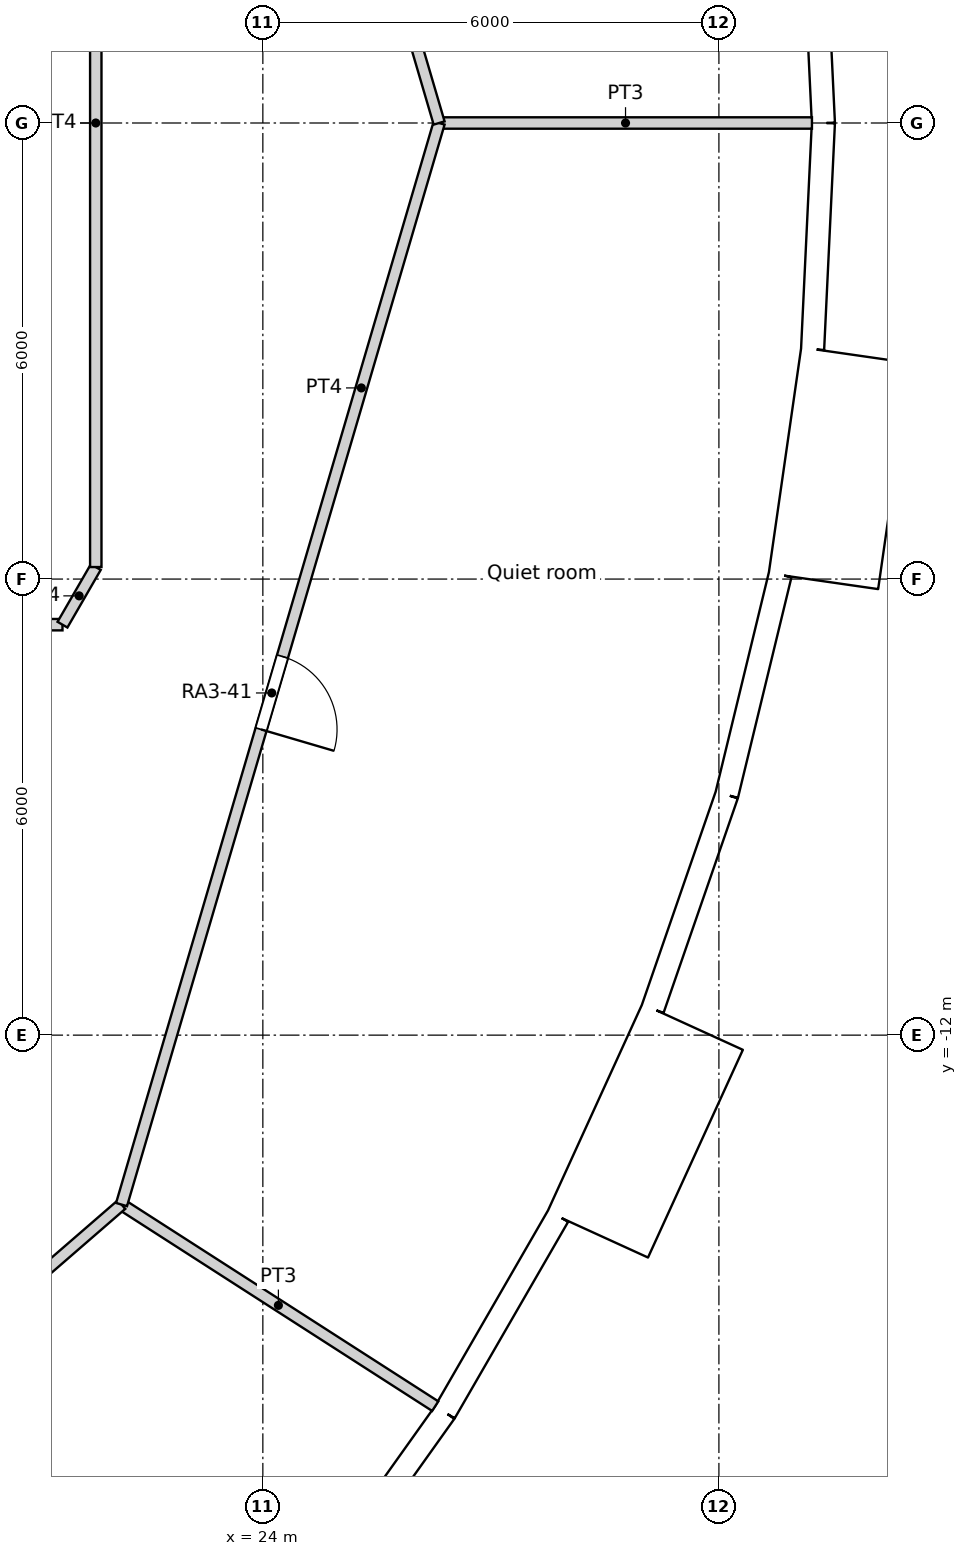
"""IFC4 building model, lengths in metres.
Left out: names, types, materials, properties, quantities, classifications, styles, units other than length and angle.
Written with IfcOpenShell. Run it as: python <this file> out.ifc"""

import sys

from ifc_helpers import new_model, si_unit, direction, frame, frame_2d, origin, origin_2d, place, context, subcontext, project, spatial, rectangle, circle, extrude, element, fill, save


model = new_model("IFC4")
c1 = context("Model", 3, precision=1e-05, world=origin(), true_north=direction((0.0, 1.0)))
c2 = subcontext(c1, "Body", "Model", "MODEL_VIEW")
j1 = project(units=[si_unit("LENGTHUNIT", "METRE"), si_unit("PLANEANGLEUNIT", "RADIAN")], contexts=[c1])
p1 = place(None, origin())
s1 = spatial("IfcSite", under=j1, at=p1, CompositionType="ELEMENT")
p2 = place(p1, origin())
s2 = spatial("IfcBuilding", under=s1, at=p2, CompositionType="ELEMENT")
p3 = place(p2, frame((0.0, 0.0, 49.8)))
s3 = spatial("IfcBuildingStorey", under=s2, at=p3, CompositionType="ELEMENT", Elevation=49.8)
for number, where, z_axis, x_axis in (
    (1, (30.275, 0.0, 0.0), (0.0, 0.0, 1.0), (1.0, 0.0, 0.0)),
    (2, (25.469, -16.368, 0.0), (0.0, 0.0, 1.0), (1.0, 0.0, 0.0)),
    (3, (28.106, -11.252, 0.0), (0.0, 0.0, 1.0), (1.0, 0.0, 0.0)),
    (4, (29.728, -5.729, 0.0), (0.0, 0.0, 1.0), (1.0, 0.0, 0.0)),
):
    element("IfcColumn", number, at=place(p3, frame(where, z_axis=z_axis, x_axis=x_axis)), inside=s3, PredefinedType="COLUMN", context=c2, shape_type="SweptSolid", body=[
        extrude(circle(Radius=0.7, at=origin_2d()), origin(), (0.0, 0.0, 1.0), 3.6),
    ])
for number, where, z_axis, x_axis in (
    (5, (24.548, 0.0, 0.0), (0.0, 0.0, 1.0), (1.0, 0.0, 0.0)),
    (6, (21.937, -11.017, 0.0), (0.0, 0.0, 1.0), (1.0, 0.0, 0.0)),
    (7, (23.886, -5.661, 0.0), (0.0, 0.0, 1.0), (1.0, 0.0, 0.0)),
):
    element("IfcColumn", number, at=place(p3, frame(where, z_axis=z_axis, x_axis=x_axis)), inside=s3, PredefinedType="COLUMN", context=c2, shape_type="SweptSolid", body=[
        extrude(circle(Radius=0.75, at=origin_2d()), origin(), (0.0, 0.0, 1.0), 3.6),
    ])
p4 = place(p3, frame((31.375, 0.0, 0.0), z_axis=(0.0, 0.0, 1.0), x_axis=(-0.047604077644, 0.998866283239, 0.0)))
e8 = element("IfcWall", 8, at=p4, inside=s3, PredefinedType="SOLIDWALL", context=c2, shape_type="SweptSolid", body=[
    extrude(rectangle(XDim=2.98, YDim=0.3, at=frame_2d((1.49, 0.0))), origin(), (0.0, 0.0, 1.0), 3.15),
])
p5 = place(p4, frame((1.49, 0.0, 1.55)))
e9 = element("IfcOpeningElement", 9, at=p5, cuts=e8, PredefinedType="OPENING", context=c2, shape_type="SweptSolid", body=[
    extrude(circle(Radius=0.9, at=origin_2d()), frame((0.0, 0.16, 0.0), z_axis=(0.0, -1.0, 0.0), x_axis=(1.0, 0.0, 0.0)), (0.0, 0.0, 1.0), 0.32),
])
p6 = place(p3, frame((24.666, -19.389, 0.0), z_axis=(0.0, 0.0, 1.0), x_axis=(0.580059407678, 0.81457417315, 0.0)))
e10 = element("IfcWall", 10, at=p6, inside=s3, PredefinedType="SOLIDWALL", context=c2, shape_type="SweptSolid", body=[
    extrude(rectangle(XDim=2.979, YDim=0.3, at=frame_2d((1.49, 0.0))), origin(), (0.0, 0.0, 1.0), 3.15),
])
p7 = place(p6, frame((1.49, 0.0, 1.55)))
e11 = element("IfcOpeningElement", 11, at=p7, cuts=e10, PredefinedType="OPENING", context=c2, shape_type="SweptSolid", body=[
    extrude(circle(Radius=0.9, at=origin_2d()), frame((0.0, 0.16, 0.0), z_axis=(0.0, -1.0, 0.0), x_axis=(1.0, 0.0, 0.0)), (0.0, 0.0, 1.0), 0.32),
])
p8 = place(p3, frame((26.394, -16.962, 0.0), z_axis=(0.0, 0.0, 1.0), x_axis=(0.500025049464, 0.866010940986, 0.0)))
e12 = element("IfcWall", 12, at=p8, inside=s3, PredefinedType="SOLIDWALL", context=c2, shape_type="SweptSolid", body=[
    extrude(rectangle(XDim=2.98, YDim=0.3, at=frame_2d((1.49, 0.0))), origin(), (0.0, 0.0, 1.0), 3.15),
])
p9 = place(p8, frame((1.49, 0.0, 1.55)))
e13 = element("IfcOpeningElement", 13, at=p9, cuts=e12, PredefinedType="OPENING", context=c2, shape_type="SweptSolid", body=[
    extrude(circle(Radius=0.9, at=origin_2d()), frame((0.0, 0.16, 0.0), z_axis=(0.0, -1.0, 0.0), x_axis=(1.0, 0.0, 0.0)), (0.0, 0.0, 1.0), 0.32),
])
p10 = place(p3, frame((28.407, -14.622, -0.45), z_axis=(0.0, 0.0, 1.0), x_axis=(0.415427028395, 0.909626508012, 0.0)))
e14 = element("IfcWall", 14, at=p10, inside=s3, PredefinedType="ELEMENTEDWALL", context=c2, shape_type="SweptSolid", body=[
    extrude(rectangle(XDim=3.0, YDim=1.45, at=frame_2d((1.5, 0.0))), origin(), (0.0, 0.0, 1.0), 3.6),
])
p11 = place(p10, frame((1.5, 0.0, 2.0)))
e15 = element("IfcOpeningElement", 15, at=p11, cuts=e14, PredefinedType="OPENING", context=c2, shape_type="SweptSolid", body=[
    extrude(circle(Radius=0.9, at=origin_2d()), frame((0.0, 0.735, 0.0), z_axis=(0.0, -1.0, 0.0), x_axis=(1.0, 0.0, 0.0)), (0.0, 0.0, 1.0), 1.47),
])
p12 = place(p3, frame((29.129, -11.655, 0.0), z_axis=(0.0, 0.0, 1.0), x_axis=(0.327071167136, 0.944999709856, 0.0)))
e16 = element("IfcWall", 16, at=p12, inside=s3, PredefinedType="SOLIDWALL", context=c2, shape_type="SweptSolid", body=[
    extrude(rectangle(XDim=2.98, YDim=0.3, at=frame_2d((1.49, 0.0))), origin(), (0.0, 0.0, 1.0), 3.15),
])
p13 = place(p12, frame((1.49, 0.0, 1.55)))
e17 = element("IfcOpeningElement", 17, at=p13, cuts=e16, PredefinedType="OPENING", context=c2, shape_type="SweptSolid", body=[
    extrude(circle(Radius=0.9, at=origin_2d()), frame((0.0, 0.16, 0.0), z_axis=(0.0, -1.0, 0.0), x_axis=(1.0, 0.0, 0.0)), (0.0, 0.0, 1.0), 0.32),
])
p14 = place(p3, frame((30.104, -8.839, 0.0), z_axis=(0.0, 0.0, 1.0), x_axis=(0.235743081534, 0.971815414319, 0.0)))
e18 = element("IfcWall", 18, at=p14, inside=s3, PredefinedType="SOLIDWALL", context=c2, shape_type="SweptSolid", body=[
    extrude(rectangle(XDim=2.979, YDim=0.3, at=frame_2d((1.49, 0.0))), origin(), (0.0, 0.0, 1.0), 3.15),
])
p15 = place(p14, frame((1.49, 0.0, 1.55)))
e19 = element("IfcOpeningElement", 19, at=p15, cuts=e18, PredefinedType="OPENING", context=c2, shape_type="SweptSolid", body=[
    extrude(circle(Radius=0.9, at=origin_2d()), frame((0.0, 0.16, 0.0), z_axis=(0.0, -1.0, 0.0), x_axis=(1.0, 0.0, 0.0)), (0.0, 0.0, 1.0), 0.32),
])
p16 = place(p3, frame((31.375, -6.027, -0.45), z_axis=(0.0, 0.0, 1.0), x_axis=(0.142332746704, 0.989818866872, 0.0)))
e20 = element("IfcWall", 20, at=p16, inside=s3, PredefinedType="ELEMENTEDWALL", context=c2, shape_type="SweptSolid", body=[
    extrude(rectangle(XDim=3.0, YDim=1.45, at=frame_2d((1.5, 0.0))), origin(), (0.0, 0.0, 1.0), 3.6),
])
p17 = place(p16, frame((1.5, 0.0, 2.0)))
e21 = element("IfcOpeningElement", 21, at=p17, cuts=e20, PredefinedType="OPENING", context=c2, shape_type="SweptSolid", body=[
    extrude(circle(Radius=0.9, at=origin_2d()), frame((0.0, 0.735, 0.0), z_axis=(0.0, -1.0, 0.0), x_axis=(1.0, 0.0, 0.0)), (0.0, 0.0, 1.0), 1.47),
])
p18 = place(p3, frame((31.233, -2.976, 0.0), z_axis=(0.0, 0.0, 1.0), x_axis=(0.047604077644, 0.998866283239, 0.0)))
e22 = element("IfcWall", 22, at=p18, inside=s3, PredefinedType="SOLIDWALL", context=c2, shape_type="SweptSolid", body=[
    extrude(rectangle(XDim=2.98, YDim=0.3, at=frame_2d((1.49, 0.0))), origin(), (0.0, 0.0, 1.0), 3.15),
])
p19 = place(p18, frame((1.49, 0.0, 1.55)))
e23 = element("IfcOpeningElement", 23, at=p19, cuts=e22, PredefinedType="OPENING", context=c2, shape_type="SweptSolid", body=[
    extrude(circle(Radius=0.9, at=origin_2d()), frame((0.0, 0.16, 0.0), z_axis=(0.0, -1.0, 0.0), x_axis=(1.0, 0.0, 0.0)), (0.0, 0.0, 1.0), 0.32),
])
p20 = place(p3, frame((15.8, -6.6, 0.0), z_axis=(0.0, 0.0, 1.0), x_axis=(1.0, 0.0, 0.0)))
e24 = element("IfcWall", 24, at=p20, inside=s3, PredefinedType="PARTITIONING", context=c2, shape_type="SweptSolid", body=[
    extrude(rectangle(XDim=5.564, YDim=0.15, at=frame_2d((2.782, 0.0))), origin(), (0.0, 0.0, 1.0), 3.15),
])
p21 = place(p3, frame((21.364, -6.6, 0.0), z_axis=(0.0, 0.0, 1.0), x_axis=(0.500277597875, 0.865865073245, 0.0)))
e25 = element("IfcWall", 25, at=p21, inside=s3, PredefinedType="PARTITIONING", context=c2, shape_type="SweptSolid", body=[
    extrude(rectangle(XDim=0.875, YDim=0.15, at=frame_2d((0.438, 0.0))), origin(), (0.0, 0.0, 1.0), 3.15),
])
p22 = place(p3, frame((21.802, -5.842, 0.0), z_axis=(0.0, 0.0, 1.0), x_axis=(0.0, 1.0, 0.0)))
e26 = element("IfcWall", 26, at=p22, inside=s3, PredefinedType="PARTITIONING", context=c2, shape_type="SweptSolid", body=[
    extrude(rectangle(XDim=11.684, YDim=0.15, at=frame_2d((5.842, 0.0))), origin(), (0.0, 0.0, 1.0), 3.15),
])
p23 = place(p3, frame((22.141, 14.229, 0.0), z_axis=(0.0, 0.0, 1.0), x_axis=(0.281730446162, -0.959493593363, 0.0)))
e27 = element("IfcWall", 27, at=p23, inside=s3, PredefinedType="PARTITIONING", context=c2, shape_type="SweptSolid", body=[
    extrude(rectangle(XDim=14.83, YDim=0.15, at=frame_2d((7.415, 0.0))), origin(), (0.0, 0.0, 1.0), 3.15),
])
p24 = place(p23, frame((5.715, 0.0, 0.0)))
e28 = element("IfcOpeningElement", 28, at=p24, cuts=e27, PredefinedType="OPENING", context=c2, shape_type="SweptSolid", body=[
    extrude(rectangle(XDim=1.8, YDim=2.1, at=frame_2d((0.9, 1.05))), frame((0.0, 0.075, 0.0), z_axis=(0.0, -1.0, 0.0), x_axis=(1.0, 0.0, 0.0)), (0.0, 0.0, 1.0), 0.15),
])
p25 = place(p3, frame((10.933, -23.94, 0.0), z_axis=(0.0, 0.0, 1.0), x_axis=(0.755770011705, 0.654837147242, 0.0)))
e29 = element("IfcWall", 29, at=p25, inside=s3, PredefinedType="PARTITIONING", context=c2, shape_type="SweptSolid", body=[
    extrude(rectangle(XDim=14.83, YDim=0.15, at=frame_2d((7.415, 0.0))), origin(), (0.0, 0.0, 1.0), 3.15),
])
p26 = place(p25, frame((2.611, 0.0, 0.0)))
e30 = element("IfcOpeningElement", 30, at=p26, cuts=e29, PredefinedType="OPENING", context=c2, shape_type="SweptSolid", body=[
    extrude(rectangle(XDim=1.8, YDim=2.1, at=frame_2d((0.9, 1.05))), frame((0.0, 0.075, 0.0), z_axis=(0.0, -1.0, 0.0), x_axis=(1.0, 0.0, 0.0)), (0.0, 0.0, 1.0), 0.15),
])
p27 = place(p3, frame((22.141, -14.229, 0.0), z_axis=(0.0, 0.0, 1.0), x_axis=(0.281730446162, 0.959493593363, 0.0)))
e31 = element("IfcWall", 31, at=p27, inside=s3, PredefinedType="PARTITIONING", context=c2, shape_type="SweptSolid", body=[
    extrude(rectangle(XDim=14.83, YDim=0.15, at=frame_2d((7.415, 0.0))), origin(), (0.0, 0.0, 1.0), 3.15),
])
p28 = place(p27, frame((6.515, 0.0, 0.0)))
e32 = element("IfcOpeningElement", 32, at=p28, cuts=e31, PredefinedType="OPENING", context=c2, shape_type="SweptSolid", body=[
    extrude(rectangle(XDim=1.0, YDim=2.04, at=frame_2d((0.5, 1.02))), frame((0.0, 0.075, 0.0), z_axis=(0.0, -1.0, 0.0), x_axis=(1.0, 0.0, 0.0)), (0.0, 0.0, 1.0), 0.15),
])
p29 = place(p3, frame((26.319, 0.0, 0.0), z_axis=(0.0, 0.0, 1.0), x_axis=(1.0, 0.0, 0.0)))
e33 = element("IfcWall", 33, at=p29, inside=s3, PredefinedType="PARTITIONING", context=c2, shape_type="SweptSolid", body=[
    extrude(rectangle(XDim=4.905, YDim=0.15, at=frame_2d((2.453, 0.0))), origin(), (0.0, 0.0, 1.0), 3.15),
])
p30 = place(p3, frame((22.141, -14.229, 0.0), z_axis=(0.0, 0.0, 1.0), x_axis=(0.841265781699, -0.540621757371, 0.0)))
e34 = element("IfcWall", 34, at=p30, inside=s3, PredefinedType="PARTITIONING", context=c2, shape_type="SweptSolid", body=[
    extrude(rectangle(XDim=4.906, YDim=0.15, at=frame_2d((2.453, 0.0))), origin(), (0.0, 0.0, 1.0), 3.15),
])
p31 = place(p5, origin())
e35 = element("IfcWindow", 35, at=p31, inside=s3, PartitioningType="SINGLE_PANEL", PredefinedType="WINDOW", context=c2, shape_type="SweptSolid", body=[
    extrude(circle(Radius=0.9, at=origin_2d()), frame((0.0, 0.12, 0.0), z_axis=(0.0, -1.0, 0.0), x_axis=(1.0, 0.0, 0.0)), (0.0, 0.0, 1.0), 0.1),
])
fill(e9, e35)
p32 = place(p7, origin())
e36 = element("IfcWindow", 36, at=p32, inside=s3, PartitioningType="SINGLE_PANEL", PredefinedType="WINDOW", context=c2, shape_type="SweptSolid", body=[
    extrude(circle(Radius=0.9, at=origin_2d()), frame((0.0, 0.12, 0.0), z_axis=(0.0, -1.0, 0.0), x_axis=(1.0, 0.0, 0.0)), (0.0, 0.0, 1.0), 0.1),
])
fill(e11, e36)
p33 = place(p9, origin())
e37 = element("IfcWindow", 37, at=p33, inside=s3, PartitioningType="SINGLE_PANEL", PredefinedType="WINDOW", context=c2, shape_type="SweptSolid", body=[
    extrude(circle(Radius=0.9, at=origin_2d()), frame((0.0, 0.12, 0.0), z_axis=(0.0, -1.0, 0.0), x_axis=(1.0, 0.0, 0.0)), (0.0, 0.0, 1.0), 0.1),
])
fill(e13, e37)
p34 = place(p11, origin())
e38 = element("IfcWindow", 38, at=p34, inside=s3, PartitioningType="SINGLE_PANEL", PredefinedType="WINDOW", context=c2, shape_type="SweptSolid", body=[
    extrude(circle(Radius=0.9, at=origin_2d()), frame((0.0, 0.695, 0.0), z_axis=(0.0, -1.0, 0.0), x_axis=(1.0, 0.0, 0.0)), (0.0, 0.0, 1.0), 0.1),
])
fill(e15, e38)
p35 = place(p13, origin())
e39 = element("IfcWindow", 39, at=p35, inside=s3, PartitioningType="SINGLE_PANEL", PredefinedType="WINDOW", context=c2, shape_type="SweptSolid", body=[
    extrude(circle(Radius=0.9, at=origin_2d()), frame((0.0, 0.12, 0.0), z_axis=(0.0, -1.0, 0.0), x_axis=(1.0, 0.0, 0.0)), (0.0, 0.0, 1.0), 0.1),
])
fill(e17, e39)
p36 = place(p15, origin())
e40 = element("IfcWindow", 40, at=p36, inside=s3, PartitioningType="SINGLE_PANEL", PredefinedType="WINDOW", context=c2, shape_type="SweptSolid", body=[
    extrude(circle(Radius=0.9, at=origin_2d()), frame((0.0, 0.12, 0.0), z_axis=(0.0, -1.0, 0.0), x_axis=(1.0, 0.0, 0.0)), (0.0, 0.0, 1.0), 0.1),
])
fill(e19, e40)
p37 = place(p17, origin())
e41 = element("IfcWindow", 41, at=p37, inside=s3, PartitioningType="SINGLE_PANEL", PredefinedType="WINDOW", context=c2, shape_type="SweptSolid", body=[
    extrude(circle(Radius=0.9, at=origin_2d()), frame((0.0, 0.695, 0.0), z_axis=(0.0, -1.0, 0.0), x_axis=(1.0, 0.0, 0.0)), (0.0, 0.0, 1.0), 0.1),
])
fill(e21, e41)
p38 = place(p19, origin())
e42 = element("IfcWindow", 42, at=p38, inside=s3, PartitioningType="SINGLE_PANEL", PredefinedType="WINDOW", context=c2, shape_type="SweptSolid", body=[
    extrude(circle(Radius=0.9, at=origin_2d()), frame((0.0, 0.12, 0.0), z_axis=(0.0, -1.0, 0.0), x_axis=(1.0, 0.0, 0.0)), (0.0, 0.0, 1.0), 0.1),
])
fill(e23, e42)
p39 = place(p28, origin())
e43 = element("IfcDoor", 43, at=p39, inside=s3, OperationType="SINGLE_SWING_RIGHT", PredefinedType="DOOR", context=c2, shape_type="SweptSolid", body=[
    extrude(rectangle(XDim=1.0, YDim=2.04, at=frame_2d((0.5, 1.02))), frame((0.0, 0.025, 0.0), z_axis=(0.0, -1.0, 0.0), x_axis=(1.0, 0.0, 0.0)), (0.0, 0.0, 1.0), 0.05),
])
fill(e32, e43)
save(model, sys.argv[1])
